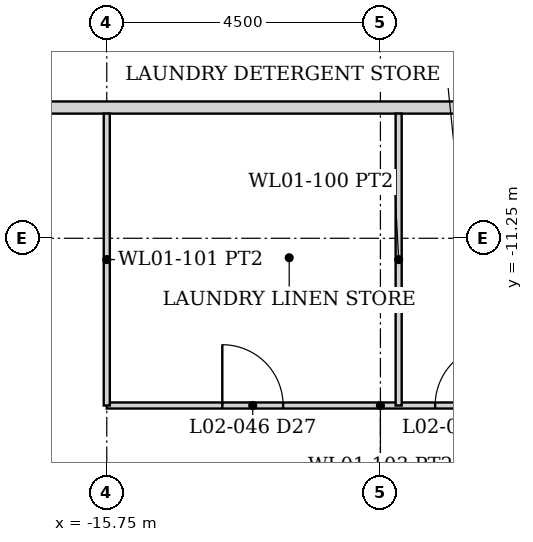
"""IFC4 building model, lengths in metres.
Left out: names, types, materials, properties, quantities, classifications, styles, units other than length and angle.
Written with IfcOpenShell. Run it as: python <this file> out.ifc"""

import sys

from ifc_helpers import new_model, si_unit, direction, frame, frame_2d, origin, place, context, subcontext, project, spatial, rectangle, extrude, element, fill, save


model = new_model("IFC4")
c1 = context("Model", 3, precision=1e-05, world=origin(), true_north=direction((0.0, 1.0)))
c2 = subcontext(c1, "Body", "Model", "MODEL_VIEW")
j1 = project(units=[si_unit("LENGTHUNIT", "METRE"), si_unit("PLANEANGLEUNIT", "RADIAN")], contexts=[c1])
p1 = place(None, origin())
s1 = spatial("IfcSite", under=j1, at=p1, CompositionType="ELEMENT")
p2 = place(p1, origin())
s2 = spatial("IfcBuilding", under=s1, at=p2, CompositionType="ELEMENT")
p3 = place(p2, frame((0.0, 0.0, 11.0)))
s3 = spatial("IfcBuildingStorey", under=s2, at=p3, CompositionType="ELEMENT", Elevation=11.0)
p4 = place(p3, frame((-25.075, -9.1, 0.0), z_axis=(0.0, 0.0, 1.0), x_axis=(1.0, 0.0, 0.0)))
e1 = element("IfcWall", 1, at=p4, inside=s3, PredefinedType="PARTITIONING", context=c2, shape_type="SweptSolid", body=[
    extrude(rectangle(XDim=50.15, YDim=0.2, at=frame_2d((25.075, 0.0))), origin(), (0.0, 0.0, 1.0), 3.829),
])
p5 = place(p4, frame((6.85, 0.0, 0.0)))
e2 = element("IfcOpeningElement", 2, at=p5, cuts=e1, PredefinedType="OPENING", context=c2, shape_type="SweptSolid", body=[
    extrude(rectangle(XDim=0.9, YDim=2.1, at=frame_2d((0.45, 1.05))), frame((0.0, 0.11, 0.0), z_axis=(0.0, -1.0, 0.0), x_axis=(1.0, 0.0, 0.0)), (0.0, 0.0, 1.0), 0.22),
])
p6 = place(p4, frame((23.625, 0.0, 0.0)))
e3 = element("IfcOpeningElement", 3, at=p6, cuts=e1, PredefinedType="OPENING", context=c2, shape_type="SweptSolid", body=[
    extrude(rectangle(XDim=0.9, YDim=2.1, at=frame_2d((0.45, 1.05))), frame((0.0, 0.11, 0.0), z_axis=(0.0, -1.0, 0.0), x_axis=(1.0, 0.0, 0.0)), (0.0, 0.0, 1.0), 0.22),
])
p7 = place(p4, frame((25.625, 0.0, 0.0)))
e4 = element("IfcOpeningElement", 4, at=p7, cuts=e1, PredefinedType="OPENING", context=c2, shape_type="SweptSolid", body=[
    extrude(rectangle(XDim=0.9, YDim=2.1, at=frame_2d((0.45, 1.05))), frame((0.0, 0.11, 0.0), z_axis=(0.0, -1.0, 0.0), x_axis=(1.0, 0.0, 0.0)), (0.0, 0.0, 1.0), 0.22),
])
p8 = place(p4, frame((32.475, 0.0, 0.0)))
e5 = element("IfcOpeningElement", 5, at=p8, cuts=e1, PredefinedType="OPENING", context=c2, shape_type="SweptSolid", body=[
    extrude(rectangle(XDim=0.9, YDim=2.1, at=frame_2d((0.45, 1.05))), frame((0.0, 0.11, 0.0), z_axis=(0.0, -1.0, 0.0), x_axis=(1.0, 0.0, 0.0)), (0.0, 0.0, 1.0), 0.22),
])
p9 = place(p4, frame((36.925, 0.0, 0.0)))
e6 = element("IfcOpeningElement", 6, at=p9, cuts=e1, PredefinedType="OPENING", context=c2, shape_type="SweptSolid", body=[
    extrude(rectangle(XDim=1.0, YDim=2.1, at=frame_2d((0.5, 1.05))), frame((0.0, 0.11, 0.0), z_axis=(0.0, -1.0, 0.0), x_axis=(1.0, 0.0, 0.0)), (0.0, 0.0, 1.0), 0.22),
])
p10 = place(p4, frame((42.4, 0.0, 0.0)))
e7 = element("IfcOpeningElement", 7, at=p10, cuts=e1, PredefinedType="OPENING", context=c2, shape_type="SweptSolid", body=[
    extrude(rectangle(XDim=0.9, YDim=2.1, at=frame_2d((0.45, 1.05))), frame((0.0, 0.11, 0.0), z_axis=(0.0, -1.0, 0.0), x_axis=(1.0, 0.0, 0.0)), (0.0, 0.0, 1.0), 0.22),
])
p11 = place(p3, frame((-15.75, -14.0, 0.0), z_axis=(0.0, 0.0, 1.0), x_axis=(1.0, 0.0, 0.0)))
e8 = element("IfcWall", 8, at=p11, inside=s3, PredefinedType="PARTITIONING", context=c2, shape_type="SweptSolid", body=[
    extrude(rectangle(XDim=9.0, YDim=0.1, at=frame_2d((4.5, 0.0))), origin(), (0.0, 0.0, 1.0), 3.829),
])
p12 = place(p11, frame((1.9, 0.0, 0.0)))
e9 = element("IfcOpeningElement", 9, at=p12, cuts=e8, PredefinedType="OPENING", context=c2, shape_type="SweptSolid", body=[
    extrude(rectangle(XDim=1.0, YDim=2.1, at=frame_2d((0.5, 1.05))), frame((0.0, 0.06, 0.0), z_axis=(0.0, -1.0, 0.0), x_axis=(1.0, 0.0, 0.0)), (0.0, 0.0, 1.0), 0.12),
])
p13 = place(p11, frame((5.4, 0.0, 0.0)))
e10 = element("IfcOpeningElement", 10, at=p13, cuts=e8, PredefinedType="OPENING", context=c2, shape_type="SweptSolid", body=[
    extrude(rectangle(XDim=1.0, YDim=2.1, at=frame_2d((0.5, 1.05))), frame((0.0, 0.06, 0.0), z_axis=(0.0, -1.0, 0.0), x_axis=(1.0, 0.0, 0.0)), (0.0, 0.0, 1.0), 0.12),
])
p14 = place(p11, frame((7.55, 0.0, 0.0)))
e11 = element("IfcOpeningElement", 11, at=p14, cuts=e8, PredefinedType="OPENING", context=c2, shape_type="SweptSolid", body=[
    extrude(rectangle(XDim=0.9, YDim=2.1, at=frame_2d((0.45, 1.05))), frame((0.0, 0.06, 0.0), z_axis=(0.0, -1.0, 0.0), x_axis=(1.0, 0.0, 0.0)), (0.0, 0.0, 1.0), 0.12),
])
for number, where, z_axis, x_axis in (
    (12, (-15.75, -14.0, 0.0), (0.0, 0.0, 1.0), (0.0, 1.0, 0.0)),
    (13, (-10.95, -14.0, 0.0), (0.0, 0.0, 1.0), (0.0, 1.0, 0.0)),
):
    element("IfcWall", number, at=place(p3, frame(where, z_axis=z_axis, x_axis=x_axis)), inside=s3, PredefinedType="PARTITIONING", context=c2, shape_type="SweptSolid", body=[
        extrude(rectangle(XDim=4.8, YDim=0.1, at=frame_2d((2.4, 0.0))), origin(), (0.0, 0.0, 1.0), 3.829),
    ])
p15 = place(p12, origin())
e14 = element("IfcDoor", 14, at=p15, inside=s3, OperationType="SINGLE_SWING_LEFT", PredefinedType="DOOR", context=c2, shape_type="SweptSolid", body=[
    extrude(rectangle(XDim=1.0, YDim=2.1, at=frame_2d((0.5, 1.05))), frame((0.0, 0.025, 0.0), z_axis=(0.0, -1.0, 0.0), x_axis=(1.0, 0.0, 0.0)), (0.0, 0.0, 1.0), 0.05),
])
fill(e9, e14)
p16 = place(p13, origin())
e15 = element("IfcDoor", 15, at=p16, inside=s3, OperationType="SINGLE_SWING_RIGHT", PredefinedType="DOOR", context=c2, shape_type="SweptSolid", body=[
    extrude(rectangle(XDim=1.0, YDim=2.1, at=frame_2d((0.5, 1.05))), frame((0.0, 0.025, 0.0), z_axis=(0.0, -1.0, 0.0), x_axis=(1.0, 0.0, 0.0)), (0.0, 0.0, 1.0), 0.05),
])
fill(e10, e15)
save(model, sys.argv[1])
